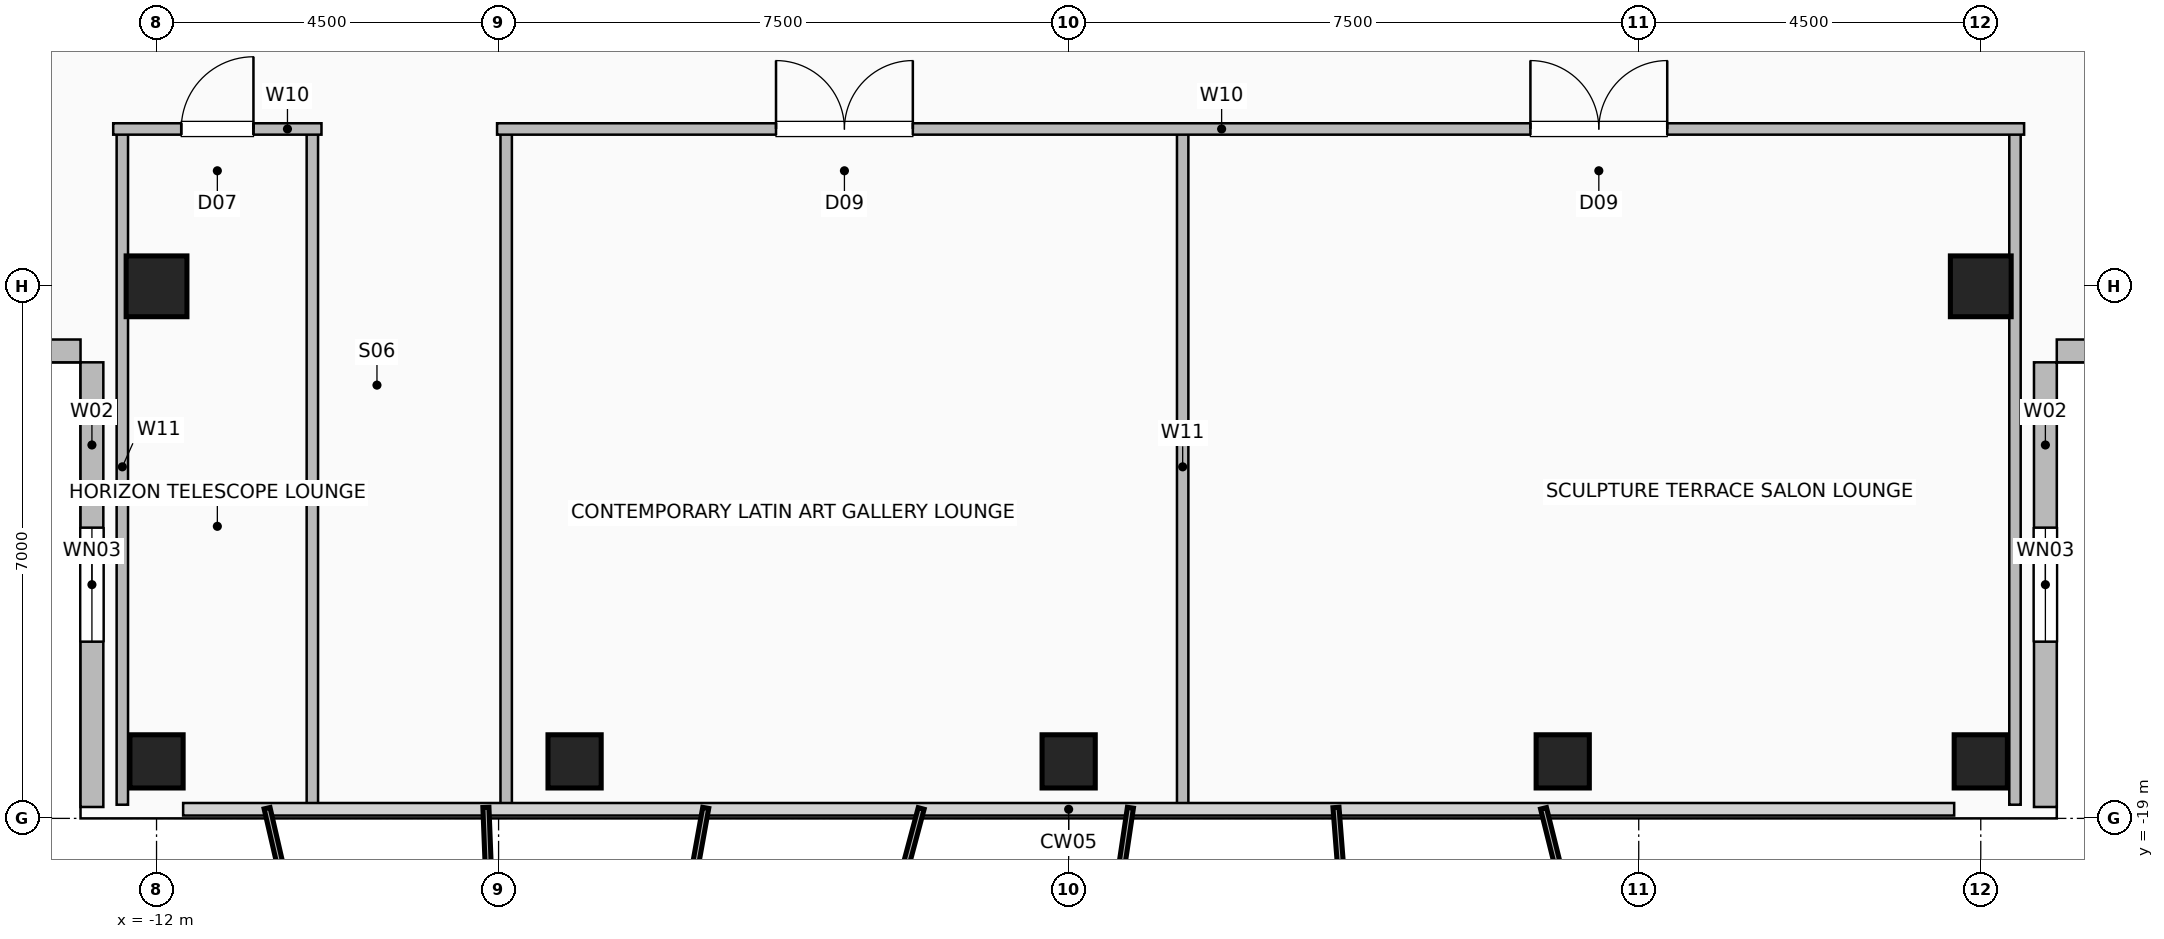
"""IFC4 building model, lengths in metres.
Left out: names, types, materials, properties, quantities, classifications, styles, units other than length and angle.
Written with IfcOpenShell. Run it as: python <this file> out.ifc"""

import sys

from ifc_helpers import new_model, si_unit, direction, frame, frame_2d, origin, origin_2d, place, context, subcontext, project, spatial, rectangle, hollow_rectangle, extrude, element, fill, save


model = new_model("IFC4")
c1 = context("Model", 3, precision=1e-05, world=origin(), true_north=direction((0.0, 1.0)))
c2 = subcontext(c1, "Body", "Model", "MODEL_VIEW")
j1 = project(units=[si_unit("LENGTHUNIT", "METRE"), si_unit("PLANEANGLEUNIT", "RADIAN")], contexts=[c1])
p1 = place(None, origin())
s1 = spatial("IfcSite", under=j1, at=p1, CompositionType="ELEMENT")
p2 = place(p1, origin())
s2 = spatial("IfcBuilding", under=s1, at=p2, CompositionType="ELEMENT")
p3 = place(p2, frame((0.0, 0.0, 272.0)))
s3 = spatial("IfcBuildingStorey", under=s2, at=p3, CompositionType="ELEMENT", Elevation=272.0)
for number, where, z_axis, x_axis in (
    (1, (-12.0, -18.25, 0.0), (0.0, 0.0, 1.0), (1.0, 0.0, 0.0)),
    (2, (-6.5, -18.25, 0.0), (0.0, 0.0, 1.0), (1.0, 0.0, 0.0)),
    (3, (0.0, -18.25, 0.0), (0.0, 0.0, 1.0), (1.0, 0.0, 0.0)),
    (4, (6.5, -18.25, 0.0), (0.0, 0.0, 1.0), (1.0, 0.0, 0.0)),
    (5, (12.0, -18.25, 0.0), (0.0, 0.0, 1.0), (1.0, 0.0, 0.0)),
):
    element("IfcColumn", number, at=place(p3, frame(where, z_axis=z_axis, x_axis=x_axis)), inside=s3, PredefinedType="COLUMN", context=c2, shape_type="SweptSolid", body=[
        extrude(hollow_rectangle(XDim=0.7, YDim=0.7, WallThickness=0.035, at=origin_2d()), origin(), (0.0, 0.0, 1.0), 3.6),
    ])
for number, where, z_axis, x_axis in (
    (6, (-12.0, -12.0, 0.0), (0.0, 0.0, 1.0), (1.0, 0.0, 0.0)),
    (7, (12.0, -12.0, 0.0), (0.0, 0.0, 1.0), (1.0, 0.0, 0.0)),
):
    element("IfcColumn", number, at=place(p3, frame(where, z_axis=z_axis, x_axis=x_axis)), inside=s3, PredefinedType="COLUMN", context=c2, shape_type="SweptSolid", body=[
        extrude(hollow_rectangle(XDim=0.8, YDim=0.8, WallThickness=0.04, at=origin_2d()), origin(), (0.0, 0.0, 1.0), 3.6),
    ])
p4 = place(p3, frame((-12.85, -18.85, 0.0), z_axis=(0.0, 0.0, 1.0), x_axis=(0.0, 1.0, 0.0)))
e8 = element("IfcWall", 8, at=p4, inside=s3, PredefinedType="SOLIDWALL", context=c2, shape_type="SweptSolid", body=[
    extrude(rectangle(XDim=5.85, YDim=0.3, at=frame_2d((2.925, 0.0))), origin(), (0.0, 0.0, 1.0), 3.36),
])
p5 = place(p4, frame((2.175, 0.0, 0.9)))
e9 = element("IfcOpeningElement", 9, at=p5, cuts=e8, PredefinedType="OPENING", context=c2, shape_type="SweptSolid", body=[
    extrude(rectangle(XDim=1.5, YDim=1.8, at=frame_2d((0.75, 0.9))), frame((0.0, 0.16, 0.0), z_axis=(0.0, -1.0, 0.0), x_axis=(1.0, 0.0, 0.0)), (0.0, 0.0, 1.0), 0.32),
])
p6 = place(p3, frame((-18.85, -12.85, 0.0), z_axis=(0.0, 0.0, 1.0), x_axis=(1.0, 0.0, 0.0)))
e10 = element("IfcWall", 10, at=p6, inside=s3, PredefinedType="SOLIDWALL", context=c2, shape_type="SweptSolid", body=[
    extrude(rectangle(XDim=5.85, YDim=0.3, at=frame_2d((2.925, 0.0))), origin(), (0.0, 0.0, 1.0), 3.36),
])
p7 = place(p3, frame((12.85, -18.85, 0.0), z_axis=(0.0, 0.0, 1.0), x_axis=(0.0, 1.0, 0.0)))
e11 = element("IfcWall", 11, at=p7, inside=s3, PredefinedType="SOLIDWALL", context=c2, shape_type="SweptSolid", body=[
    extrude(rectangle(XDim=5.85, YDim=0.3, at=frame_2d((2.925, 0.0))), origin(), (0.0, 0.0, 1.0), 3.36),
])
p8 = place(p7, frame((2.175, 0.0, 0.9)))
e12 = element("IfcOpeningElement", 12, at=p8, cuts=e11, PredefinedType="OPENING", context=c2, shape_type="SweptSolid", body=[
    extrude(rectangle(XDim=1.5, YDim=1.8, at=frame_2d((0.75, 0.9))), frame((0.0, 0.16, 0.0), z_axis=(0.0, -1.0, 0.0), x_axis=(1.0, 0.0, 0.0)), (0.0, 0.0, 1.0), 0.32),
])
p9 = place(p3, frame((18.85, -12.85, 0.0), z_axis=(0.0, 0.0, 1.0), x_axis=(-1.0, 0.0, 0.0)))
e13 = element("IfcWall", 13, at=p9, inside=s3, PredefinedType="SOLIDWALL", context=c2, shape_type="SweptSolid", body=[
    extrude(rectangle(XDim=5.85, YDim=0.3, at=frame_2d((2.925, 0.0))), origin(), (0.0, 0.0, 1.0), 3.36),
])
for number, where, z_axis, x_axis in (
    (14, (-12.45, -18.82, 0.0), (0.0, 0.0, 1.0), (0.0, 1.0, 0.0)),
    (15, (-9.95, -18.82, 0.0), (0.0, 0.0, 1.0), (0.0, 1.0, 0.0)),
):
    element("IfcWall", number, at=place(p3, frame(where, z_axis=z_axis, x_axis=x_axis)), inside=s3, PredefinedType="PARTITIONING", context=c2, shape_type="SweptSolid", body=[
        extrude(rectangle(XDim=8.89, YDim=0.15, at=frame_2d((4.445, 0.0))), origin(), (0.0, 0.0, 1.0), 3.36),
    ])
p10 = place(p3, frame((-12.57, -9.93, 0.0), z_axis=(0.0, 0.0, 1.0), x_axis=(1.0, 0.0, 0.0)))
e16 = element("IfcWall", 16, at=p10, inside=s3, PredefinedType="PARTITIONING", context=c2, shape_type="SweptSolid", body=[
    extrude(rectangle(XDim=2.74, YDim=0.15, at=frame_2d((1.37, 0.0))), origin(), (0.0, 0.0, 1.0), 3.36),
])
p11 = place(p10, frame((0.895, 0.0, 0.0)))
e17 = element("IfcOpeningElement", 17, at=p11, cuts=e16, PredefinedType="OPENING", context=c2, shape_type="SweptSolid", body=[
    extrude(rectangle(XDim=0.95, YDim=2.06, at=frame_2d((0.475, 1.03))), frame((0.0, 0.085, 0.0), z_axis=(0.0, -1.0, 0.0), x_axis=(1.0, 0.0, 0.0)), (0.0, 0.0, 1.0), 0.17),
])
for number, where, z_axis, x_axis in (
    (18, (-7.4, -18.82, 0.0), (0.0, 0.0, 1.0), (0.0, 1.0, 0.0)),
    (19, (1.5, -18.82, 0.0), (0.0, 0.0, 1.0), (0.0, 1.0, 0.0)),
    (20, (12.45, -18.82, 0.0), (0.0, 0.0, 1.0), (0.0, 1.0, 0.0)),
):
    element("IfcWall", number, at=place(p3, frame(where, z_axis=z_axis, x_axis=x_axis)), inside=s3, PredefinedType="PARTITIONING", context=c2, shape_type="SweptSolid", body=[
        extrude(rectangle(XDim=8.89, YDim=0.15, at=frame_2d((4.445, 0.0))), origin(), (0.0, 0.0, 1.0), 3.36),
    ])
p12 = place(p3, frame((-7.52, -9.93, 0.0), z_axis=(0.0, 0.0, 1.0), x_axis=(1.0, 0.0, 0.0)))
e21 = element("IfcWall", 21, at=p12, inside=s3, PredefinedType="PARTITIONING", context=c2, shape_type="SweptSolid", body=[
    extrude(rectangle(XDim=20.09, YDim=0.15, at=frame_2d((10.045, 0.0))), origin(), (0.0, 0.0, 1.0), 3.36),
])
p13 = place(p12, frame((3.67, 0.0, 0.0)))
e22 = element("IfcOpeningElement", 22, at=p13, cuts=e21, PredefinedType="OPENING", context=c2, shape_type="SweptSolid", body=[
    extrude(rectangle(XDim=1.8, YDim=2.08, at=frame_2d((0.9, 1.04))), frame((0.0, 0.085, 0.0), z_axis=(0.0, -1.0, 0.0), x_axis=(1.0, 0.0, 0.0)), (0.0, 0.0, 1.0), 0.17),
])
p14 = place(p12, frame((13.595, 0.0, 0.0)))
e23 = element("IfcOpeningElement", 23, at=p14, cuts=e21, PredefinedType="OPENING", context=c2, shape_type="SweptSolid", body=[
    extrude(rectangle(XDim=1.8, YDim=2.08, at=frame_2d((0.9, 1.04))), frame((0.0, 0.085, 0.0), z_axis=(0.0, -1.0, 0.0), x_axis=(1.0, 0.0, 0.0)), (0.0, 0.0, 1.0), 0.17),
])
p15 = place(p5, origin())
e24 = element("IfcWindow", 24, at=p15, inside=s3, PartitioningType="SINGLE_PANEL", PredefinedType="WINDOW", context=c2, shape_type="SweptSolid", body=[
    extrude(rectangle(XDim=1.5, YDim=1.8, at=frame_2d((0.75, 0.9))), frame((0.0, 0.03, 0.0), z_axis=(0.0, -1.0, 0.0), x_axis=(1.0, 0.0, 0.0)), (0.0, 0.0, 1.0), 0.06),
])
fill(e9, e24)
p16 = place(p8, origin())
e25 = element("IfcWindow", 25, at=p16, inside=s3, PartitioningType="SINGLE_PANEL", PredefinedType="WINDOW", context=c2, shape_type="SweptSolid", body=[
    extrude(rectangle(XDim=1.5, YDim=1.8, at=frame_2d((0.75, 0.9))), frame((0.0, 0.03, 0.0), z_axis=(0.0, -1.0, 0.0), x_axis=(1.0, 0.0, 0.0)), (0.0, 0.0, 1.0), 0.06),
])
fill(e12, e25)
p17 = place(p11, origin())
e26 = element("IfcDoor", 26, at=p17, inside=s3, OperationType="SINGLE_SWING_RIGHT", PredefinedType="DOOR", context=c2, shape_type="SweptSolid", body=[
    extrude(rectangle(XDim=0.95, YDim=2.06, at=frame_2d((0.475, 1.03))), frame((0.0, 0.025, 0.0), z_axis=(0.0, -1.0, 0.0), x_axis=(1.0, 0.0, 0.0)), (0.0, 0.0, 1.0), 0.05),
])
fill(e17, e26)
p18 = place(p13, origin())
e27 = element("IfcDoor", 27, at=p18, inside=s3, OperationType="DOUBLE_DOOR_SINGLE_SWING", PredefinedType="DOOR", context=c2, shape_type="SweptSolid", body=[
    extrude(rectangle(XDim=1.8, YDim=2.08, at=frame_2d((0.9, 1.04))), frame((0.0, 0.025, 0.0), z_axis=(0.0, -1.0, 0.0), x_axis=(1.0, 0.0, 0.0)), (0.0, 0.0, 1.0), 0.05),
])
fill(e22, e27)
p19 = place(p14, origin())
e28 = element("IfcDoor", 28, at=p19, inside=s3, OperationType="DOUBLE_DOOR_SINGLE_SWING", PredefinedType="DOOR", context=c2, shape_type="SweptSolid", body=[
    extrude(rectangle(XDim=1.8, YDim=2.08, at=frame_2d((0.9, 1.04))), frame((0.0, 0.025, 0.0), z_axis=(0.0, -1.0, 0.0), x_axis=(1.0, 0.0, 0.0)), (0.0, 0.0, 1.0), 0.05),
])
fill(e23, e28)
save(model, sys.argv[1])
